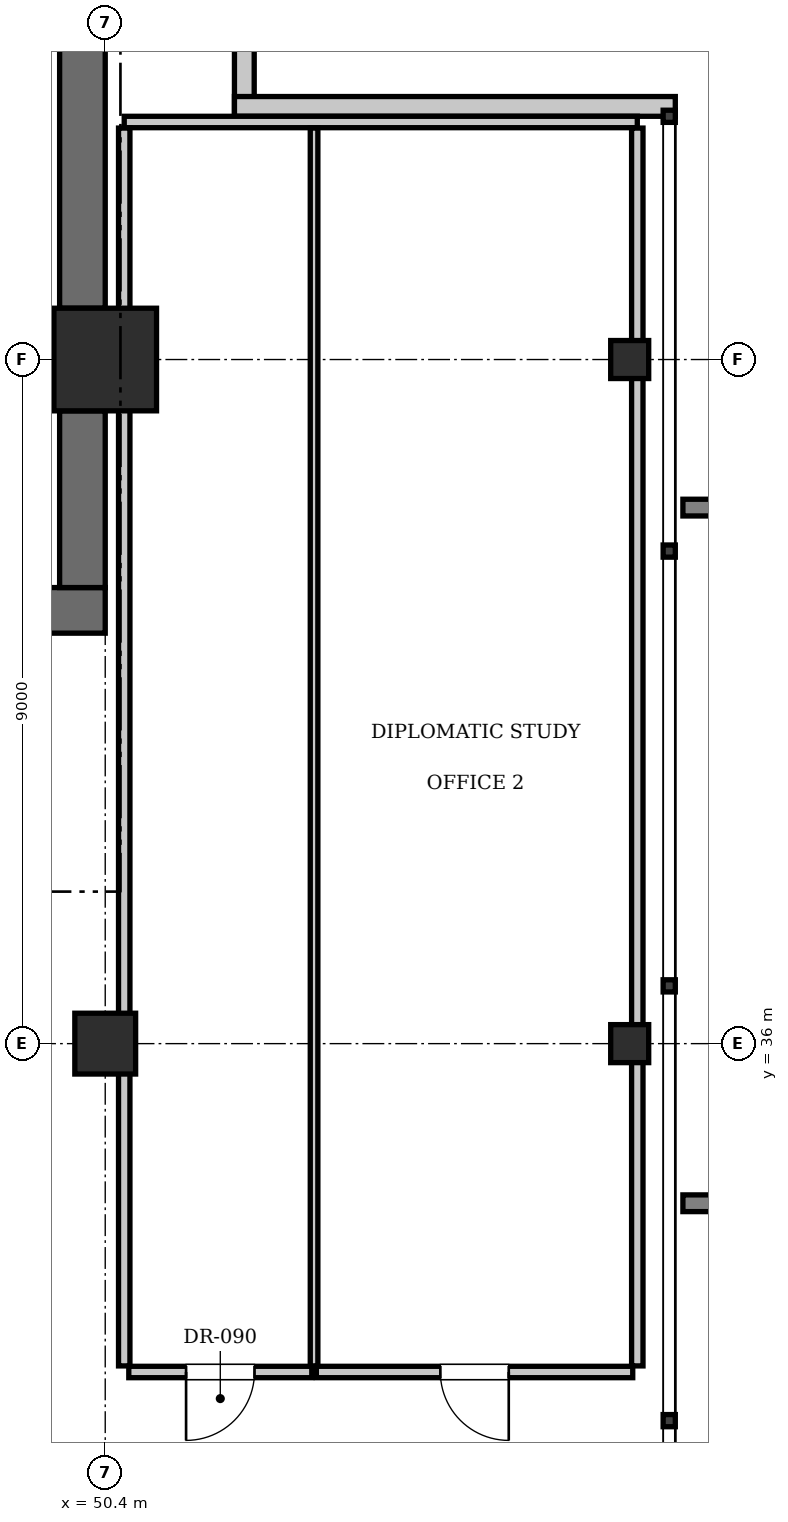
"""IFC4 building model, lengths in metres.
Left out: names, types, materials, properties, quantities, classifications, styles, units other than length and angle.
Written with IfcOpenShell. Run it as: python <this file> out.ifc"""

import sys

from ifc_helpers import new_model, si_unit, direction, frame, frame_2d, origin, origin_2d, place, context, subcontext, project, spatial, rectangle, i_section, extrude, element, fill, save


model = new_model("IFC4")
c1 = context("Model", 3, precision=1e-05, world=origin(), true_north=direction((0.0, 1.0)))
c2 = subcontext(c1, "Body", "Model", "MODEL_VIEW")
j1 = project(units=[si_unit("LENGTHUNIT", "METRE"), si_unit("PLANEANGLEUNIT", "RADIAN")], contexts=[c1])
p1 = place(None, origin())
s1 = spatial("IfcSite", under=j1, at=p1, CompositionType="ELEMENT")
p2 = place(p1, origin())
s2 = spatial("IfcBuilding", under=s1, at=p2, CompositionType="ELEMENT")
p3 = place(p2, frame((0.0, 0.0, 341.25)))
s3 = spatial("IfcBuildingStorey", under=s2, at=p3, CompositionType="ELEMENT", Elevation=341.25)
p4 = place(p3, frame((50.4, 45.0, 0.0), z_axis=(0.0, 0.0, 1.0), x_axis=(1.0, 0.0, 0.0)))
e1 = element("IfcColumn", 1, at=p4, inside=s3, PredefinedType="COLUMN", context=c2, shape_type="SweptSolid", body=[
    extrude(rectangle(XDim=1.35, YDim=1.35, at=origin_2d()), origin(), (0.0, 0.0, 1.0), 3.85),
])
p5 = place(p3, frame((43.6, 41.7, 0.0), z_axis=(0.0, 0.0, 1.0), x_axis=(1.0, 0.0, 0.0)))
e2 = element("IfcWall", 2, at=p5, inside=s3, PredefinedType="SHEAR", context=c2, shape_type="SweptSolid", body=[
    extrude(rectangle(XDim=6.8, YDim=0.6, at=frame_2d((3.4, 0.0))), origin(), (0.0, 0.0, 1.0), 3.85),
])
p6 = place(p5, frame((3.9, 0.0, 0.0)))
e3 = element("IfcOpeningElement", 3, at=p6, cuts=e2, PredefinedType="OPENING", context=c2, shape_type="SweptSolid", body=[
    extrude(rectangle(XDim=1.15, YDim=2.15, at=frame_2d((0.575, 1.075))), frame((0.0, 0.31, 0.0), z_axis=(0.0, -1.0, 0.0), x_axis=(1.0, 0.0, 0.0)), (0.0, 0.0, 1.0), 0.62),
])
p7 = place(p5, frame((0.55, 0.0, 0.0)))
e4 = element("IfcOpeningElement", 4, at=p7, cuts=e2, PredefinedType="OPENING", context=c2, shape_type="SweptSolid", body=[
    extrude(rectangle(XDim=1.1, YDim=2.2, at=frame_2d((0.55, 1.1))), frame((0.0, 0.31, 0.0), z_axis=(0.0, -1.0, 0.0), x_axis=(1.0, 0.0, 0.0)), (0.0, 0.0, 1.0), 0.62),
])
p8 = place(p3, frame((50.1, 42.0, 0.0), z_axis=(0.0, 0.0, 1.0), x_axis=(0.0, 1.0, 0.0)))
e5 = element("IfcWall", 5, at=p8, inside=s3, PredefinedType="SHEAR", context=c2, shape_type="SweptSolid", body=[
    extrude(rectangle(XDim=2.325, YDim=0.6, at=frame_2d((1.163, 0.0))), origin(), (0.0, 0.0, 1.0), 3.85),
])
p9 = place(p3, frame((50.1, 45.675, 0.0), z_axis=(0.0, 0.0, 1.0), x_axis=(0.0, 1.0, 0.0)))
e6 = element("IfcWall", 6, at=p9, inside=s3, PredefinedType="SHEAR", context=c2, shape_type="SweptSolid", body=[
    extrude(rectangle(XDim=7.725, YDim=0.6, at=frame_2d((3.862, 0.0))), origin(), (0.0, 0.0, 1.0), 3.85),
])
p10 = place(p3, frame((50.4, 36.0, 0.0), z_axis=(0.0, 0.0, 1.0), x_axis=(1.0, 0.0, 0.0)))
e7 = element("IfcColumn", 7, at=p10, inside=s3, PredefinedType="COLUMN", context=c2, shape_type="SweptSolid", body=[
    extrude(rectangle(XDim=0.8, YDim=0.8, at=origin_2d()), origin(), (0.0, 0.0, 1.0), 3.85),
])
for number, where, z_axis, x_axis in (
    (8, (57.3, 36.0, 0.0), (0.0, 0.0, 1.0), (1.0, 0.0, 0.0)),
    (9, (57.3, 45.0, 0.0), (0.0, 0.0, 1.0), (1.0, 0.0, 0.0)),
):
    element("IfcColumn", number, at=place(p3, frame(where, z_axis=z_axis, x_axis=x_axis)), inside=s3, PredefinedType="COLUMN", context=c2, shape_type="SweptSolid", body=[
        extrude(i_section(OverallWidth=0.5, OverallDepth=0.5, WebThickness=0.022, FlangeThickness=0.032, at=origin_2d()), origin(), (0.0, 0.0, 1.0), 3.85),
    ])
p11 = place(p3, frame((52.23, 54.0, 0.0), z_axis=(0.0, 0.0, 1.0), x_axis=(0.0, -1.0, 0.0)))
e10 = element("IfcWall", 10, at=p11, inside=s3, PredefinedType="SOLIDWALL", context=c2, shape_type="SweptSolid", body=[
    extrude(rectangle(XDim=5.8, YDim=0.26, at=frame_2d((2.9, 0.0))), origin(), (0.0, 0.0, 1.0), 3.61),
])
p12 = place(p3, frame((52.1, 48.33, 0.0), z_axis=(0.0, 0.0, 1.0), x_axis=(1.0, 0.0, 0.0)))
e11 = element("IfcWall", 11, at=p12, inside=s3, PredefinedType="SOLIDWALL", context=c2, shape_type="SweptSolid", body=[
    extrude(rectangle(XDim=5.8, YDim=0.26, at=frame_2d((2.9, 0.0))), origin(), (0.0, 0.0, 1.0), 3.61),
])
p13 = place(p3, frame((50.65, 48.125, 0.0), z_axis=(0.0, 0.0, 1.0), x_axis=(1.0, 0.0, 0.0)))
e12 = element("IfcWall", 12, at=p13, inside=s3, PredefinedType="PARTITIONING", context=c2, shape_type="SweptSolid", body=[
    extrude(rectangle(XDim=6.75, YDim=0.15, at=frame_2d((3.375, 0.0))), origin(), (0.0, 0.0, 1.0), 3.61),
])
p14 = place(p3, frame((50.65, 31.76, 0.0), z_axis=(0.0, 0.0, 1.0), x_axis=(0.0, 1.0, 0.0)))
e13 = element("IfcWall", 13, at=p14, inside=s3, PredefinedType="PARTITIONING", context=c2, shape_type="SweptSolid", body=[
    extrude(rectangle(XDim=16.285, YDim=0.15, at=frame_2d((8.143, 0.0))), origin(), (0.0, 0.0, 1.0), 3.61),
])
p15 = place(p3, frame((57.4, 31.76, 0.0), z_axis=(0.0, 0.0, 1.0), x_axis=(0.0, 1.0, 0.0)))
e14 = element("IfcWall", 14, at=p15, inside=s3, PredefinedType="PARTITIONING", context=c2, shape_type="SweptSolid", body=[
    extrude(rectangle(XDim=16.285, YDim=0.15, at=frame_2d((8.143, 0.0))), origin(), (0.0, 0.0, 1.0), 3.141),
])
p16 = place(p3, frame((50.71, 31.68, 0.0), z_axis=(0.0, 0.0, 1.0), x_axis=(1.0, 0.0, 0.0)))
e15 = element("IfcWall", 15, at=p16, inside=s3, PredefinedType="PARTITIONING", context=c2, shape_type="SweptSolid", body=[
    extrude(rectangle(XDim=2.407, YDim=0.15, at=frame_2d((1.204, 0.0))), origin(), (0.0, 0.0, 1.0), 3.61),
])
p17 = place(p16, frame((0.754, 0.0, 0.0)))
e16 = element("IfcOpeningElement", 16, at=p17, cuts=e15, PredefinedType="OPENING", context=c2, shape_type="SweptSolid", body=[
    extrude(rectangle(XDim=0.9, YDim=2.1, at=frame_2d((0.45, 1.05))), frame((0.0, 0.085, 0.0), z_axis=(0.0, -1.0, 0.0), x_axis=(1.0, 0.0, 0.0)), (0.0, 0.0, 1.0), 0.17),
])
p18 = place(p3, frame((53.147, 31.76, 0.0), z_axis=(0.0, 0.0, 1.0), x_axis=(0.0, 1.0, 0.0)))
e17 = element("IfcWall", 17, at=p18, inside=s3, PredefinedType="PARTITIONING", context=c2, shape_type="SweptSolid", body=[
    extrude(rectangle(XDim=16.285, YDim=0.1, at=frame_2d((8.143, 0.0))), origin(), (0.0, 0.0, 1.0), 3.61),
])
p19 = place(p3, frame((53.177, 31.68, 0.0), z_axis=(0.0, 0.0, 1.0), x_axis=(1.0, 0.0, 0.0)))
e18 = element("IfcWall", 18, at=p19, inside=s3, PredefinedType="PARTITIONING", context=c2, shape_type="SweptSolid", body=[
    extrude(rectangle(XDim=4.163, YDim=0.15, at=frame_2d((2.081, 0.0))), origin(), (0.0, 0.0, 1.0), 3.61),
])
p20 = place(p19, frame((1.631, 0.0, 0.0)))
e19 = element("IfcOpeningElement", 19, at=p20, cuts=e18, PredefinedType="OPENING", context=c2, shape_type="SweptSolid", body=[
    extrude(rectangle(XDim=0.9, YDim=2.1, at=frame_2d((0.45, 1.05))), frame((0.0, 0.085, 0.0), z_axis=(0.0, -1.0, 0.0), x_axis=(1.0, 0.0, 0.0)), (0.0, 0.0, 1.0), 0.17),
])
p21 = place(p17, frame((0.9, 0.0, 0.0), z_axis=(0.0, 0.0, 1.0), x_axis=(-1.0, 0.0, 0.0)))
e20 = element("IfcDoor", 20, at=p21, inside=s3, OperationType="SINGLE_SWING_RIGHT", PredefinedType="DOOR", context=c2, shape_type="SweptSolid", body=[
    extrude(rectangle(XDim=0.9, YDim=2.1, at=frame_2d((0.45, 1.05))), frame((0.0, 0.025, 0.0), z_axis=(0.0, -1.0, 0.0), x_axis=(1.0, 0.0, 0.0)), (0.0, 0.0, 1.0), 0.05),
])
fill(e16, e20)
p22 = place(p20, frame((0.9, 0.0, 0.0), z_axis=(0.0, 0.0, 1.0), x_axis=(-1.0, 0.0, 0.0)))
e21 = element("IfcDoor", 21, at=p22, inside=s3, OperationType="SINGLE_SWING_LEFT", PredefinedType="DOOR", context=c2, shape_type="SweptSolid", body=[
    extrude(rectangle(XDim=0.9, YDim=2.1, at=frame_2d((0.45, 1.05))), frame((0.0, 0.025, 0.0), z_axis=(0.0, -1.0, 0.0), x_axis=(1.0, 0.0, 0.0)), (0.0, 0.0, 1.0), 0.05),
])
fill(e19, e21)
save(model, sys.argv[1])
